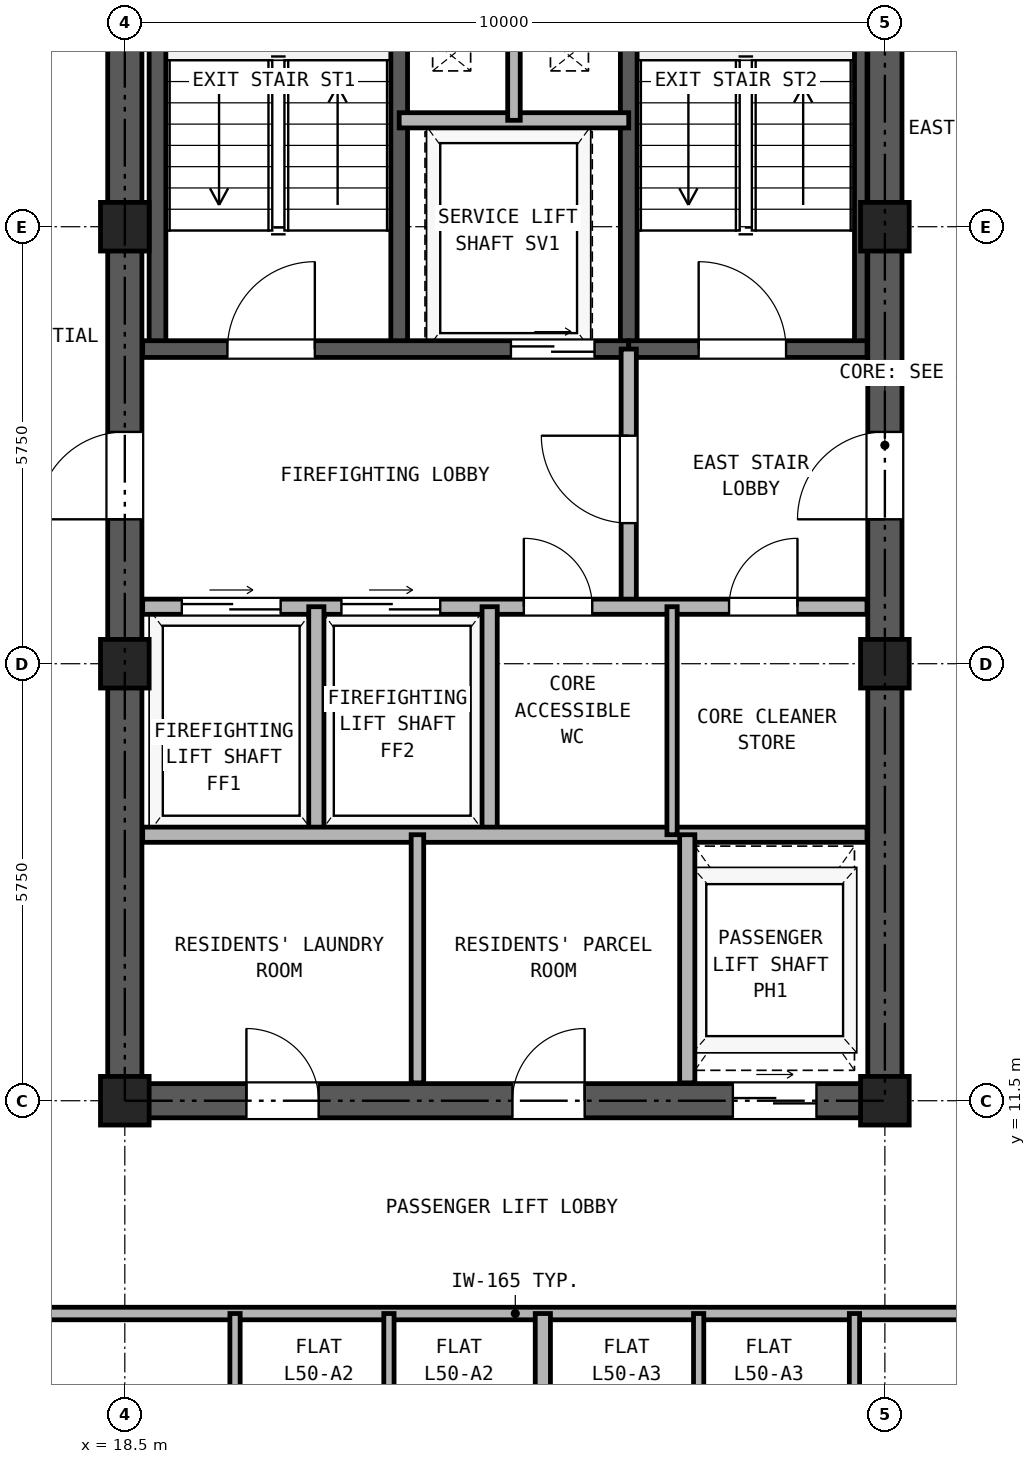
"""IFC4 building model, lengths in metres.
Left out: names, types, materials, properties, quantities, classifications, styles, units other than length and angle.
Written with IfcOpenShell. Run it as: python <this file> out.ifc"""

import sys

from ifc_helpers import new_model, si_unit, direction, frame, frame_2d, origin, origin_2d, place, context, subcontext, project, spatial, rectangle, hollow_rectangle, extrude, source, transform, mapped, element, fill, save


model = new_model("IFC4")
c1 = context("Model", 3, precision=1e-05, world=origin(), true_north=direction((0.0, 1.0)))
c2 = subcontext(c1, "Body", "Model", "MODEL_VIEW")
j1 = project(units=[si_unit("LENGTHUNIT", "METRE"), si_unit("PLANEANGLEUNIT", "RADIAN")], contexts=[c1])
p1 = place(None, origin())
s1 = spatial("IfcSite", under=j1, at=p1, CompositionType="ELEMENT")
p2 = place(p1, origin())
s2 = spatial("IfcBuilding", under=s1, at=p2, CompositionType="ELEMENT")
p3 = place(p2, frame((0.0, 0.0, 178.5)))
s3 = spatial("IfcBuildingStorey", under=s2, at=p3, CompositionType="ELEMENT", Elevation=178.5)
m1 = source(origin(), c2, "Body", "SweptSolid", [
    extrude(hollow_rectangle(XDim=0.64, YDim=0.64, WallThickness=0.035, at=origin_2d()), origin(), (0.0, 0.0, 1.0), 2.95),
])
for number, where, z_axis, x_axis in (
    (1, (18.5, 11.5, 0.0), (0.0, 0.0, 1.0), (1.0, 0.0, 0.0)),
    (2, (18.5, 17.25, 0.0), (0.0, 0.0, 1.0), (1.0, 0.0, 0.0)),
    (3, (18.5, 23.0, 0.0), (0.0, 0.0, 1.0), (1.0, 0.0, 0.0)),
    (4, (28.5, 11.5, 0.0), (0.0, 0.0, 1.0), (1.0, 0.0, 0.0)),
    (5, (28.5, 17.25, 0.0), (0.0, 0.0, 1.0), (1.0, 0.0, 0.0)),
    (6, (28.5, 23.0, 0.0), (0.0, 0.0, 1.0), (1.0, 0.0, 0.0)),
):
    element("IfcColumn", number, at=place(p3, frame(where, z_axis=z_axis, x_axis=x_axis)), inside=s3, PredefinedType="COLUMN", context=c2, shape_type="MappedRepresentation", body=[
        mapped(m1, transform((0.0, 0.0, 0.0), x_axis=(1.0, 0.0, 0.0), y_axis=(0.0, 1.0, 0.0), z_axis=(0.0, 0.0, 1.0), scale=1.0)),
    ])
p4 = place(p3, frame((18.275, 11.5, 0.0), z_axis=(0.0, 0.0, 1.0), x_axis=(1.0, 0.0, 0.0)))
e7 = element("IfcWall", 7, at=p4, inside=s3, PredefinedType="SHEAR", context=c2, shape_type="SweptSolid", body=[
    extrude(rectangle(XDim=10.45, YDim=0.45, at=frame_2d((5.225, 0.0))), origin(), (0.0, 0.0, 1.0), 2.95),
])
p5 = place(p4, frame((1.825, 0.0, 0.0)))
e8 = element("IfcOpeningElement", 8, at=p5, cuts=e7, PredefinedType="OPENING", context=c2, shape_type="SweptSolid", body=[
    extrude(rectangle(XDim=0.95, YDim=2.15, at=frame_2d((0.475, 1.075))), frame((0.0, 0.235, 0.0), z_axis=(0.0, -1.0, 0.0), x_axis=(1.0, 0.0, 0.0)), (0.0, 0.0, 1.0), 0.47),
])
p6 = place(p4, frame((5.325, 0.0, 0.0)))
e9 = element("IfcOpeningElement", 9, at=p6, cuts=e7, PredefinedType="OPENING", context=c2, shape_type="SweptSolid", body=[
    extrude(rectangle(XDim=0.95, YDim=2.15, at=frame_2d((0.475, 1.075))), frame((0.0, 0.235, 0.0), z_axis=(0.0, -1.0, 0.0), x_axis=(1.0, 0.0, 0.0)), (0.0, 0.0, 1.0), 0.47),
])
p7 = place(p4, frame((8.225, 0.0, 0.0)))
e10 = element("IfcOpeningElement", 10, at=p7, cuts=e7, PredefinedType="OPENING", context=c2, shape_type="SweptSolid", body=[
    extrude(rectangle(XDim=1.1, YDim=2.25, at=frame_2d((0.55, 1.125))), frame((0.0, 0.235, 0.0), z_axis=(0.0, -1.0, 0.0), x_axis=(1.0, 0.0, 0.0)), (0.0, 0.0, 1.0), 0.47),
])
p8 = place(p3, frame((18.5, 11.725, 0.0), z_axis=(0.0, 0.0, 1.0), x_axis=(0.0, 1.0, 0.0)))
e11 = element("IfcWall", 11, at=p8, inside=s3, PredefinedType="SHEAR", context=c2, shape_type="SweptSolid", body=[
    extrude(rectangle(XDim=16.8, YDim=0.45, at=frame_2d((8.4, 0.0))), origin(), (0.0, 0.0, 1.0), 2.95),
])
p9 = place(p8, frame((7.425, 0.0, 0.0)))
e12 = element("IfcOpeningElement", 12, at=p9, cuts=e11, PredefinedType="OPENING", context=c2, shape_type="SweptSolid", body=[
    extrude(rectangle(XDim=1.15, YDim=2.2, at=frame_2d((0.575, 1.1))), frame((0.0, 0.235, 0.0), z_axis=(0.0, -1.0, 0.0), x_axis=(1.0, 0.0, 0.0)), (0.0, 0.0, 1.0), 0.47),
])
p10 = place(p3, frame((28.5, 11.725, 0.0), z_axis=(0.0, 0.0, 1.0), x_axis=(0.0, 1.0, 0.0)))
e13 = element("IfcWall", 13, at=p10, inside=s3, PredefinedType="SHEAR", context=c2, shape_type="SweptSolid", body=[
    extrude(rectangle(XDim=16.8, YDim=0.45, at=frame_2d((8.4, 0.0))), origin(), (0.0, 0.0, 1.0), 2.95),
])
p11 = place(p10, frame((7.425, 0.0, 0.0)))
e14 = element("IfcOpeningElement", 14, at=p11, cuts=e13, PredefinedType="OPENING", context=c2, shape_type="SweptSolid", body=[
    extrude(rectangle(XDim=1.15, YDim=2.2, at=frame_2d((0.575, 1.1))), frame((0.0, 0.235, 0.0), z_axis=(0.0, -1.0, 0.0), x_axis=(1.0, 0.0, 0.0)), (0.0, 0.0, 1.0), 0.47),
])
for number, where, z_axis, x_axis in (
    (15, (18.93, 21.39, 0.0), (0.0, 0.0, 1.0), (0.0, 1.0, 0.0)),
    (16, (22.11, 21.39, 0.0), (0.0, 0.0, 1.0), (0.0, 1.0, 0.0)),
    (17, (25.13, 21.39, 0.0), (0.0, 0.0, 1.0), (0.0, 1.0, 0.0)),
):
    element("IfcWall", number, at=place(p3, frame(where, z_axis=z_axis, x_axis=x_axis)), inside=s3, PredefinedType="SOLIDWALL", context=c2, shape_type="SweptSolid", body=[
        extrude(rectangle(XDim=7.11, YDim=0.22, at=frame_2d((3.555, 0.0))), origin(), (0.0, 0.0, 1.0), 2.95),
    ])
p12 = place(p3, frame((28.183, 21.39, 0.0), z_axis=(0.0, 0.0, 1.0), x_axis=(0.0, 1.0, 0.0)))
e18 = element("IfcWall", 18, at=p12, inside=s3, PredefinedType="PARTITIONING", context=c2, shape_type="SweptSolid", body=[
    extrude(rectangle(XDim=6.945, YDim=0.165, at=frame_2d((3.473, 0.0))), origin(), (0.0, 0.0, 1.0), 2.95),
])
p13 = place(p3, frame((18.735, 21.39, 0.0), z_axis=(0.0, 0.0, 1.0), x_axis=(1.0, 0.0, 0.0)))
e19 = element("IfcWall", 19, at=p13, inside=s3, PredefinedType="SOLIDWALL", context=c2, shape_type="SweptSolid", body=[
    extrude(rectangle(XDim=6.395, YDim=0.22, at=frame_2d((3.197, 0.0))), origin(), (0.0, 0.0, 1.0), 2.95),
])
p14 = place(p13, frame((1.115, 0.0, 0.0)))
e20 = element("IfcOpeningElement", 20, at=p14, cuts=e19, PredefinedType="OPENING", context=c2, shape_type="SweptSolid", body=[
    extrude(rectangle(XDim=1.15, YDim=2.2, at=frame_2d((0.575, 1.1))), frame((0.0, 0.12, 0.0), z_axis=(0.0, -1.0, 0.0), x_axis=(1.0, 0.0, 0.0)), (0.0, 0.0, 1.0), 0.24),
])
p15 = place(p13, frame((4.845, 0.0, 0.0)))
e21 = element("IfcOpeningElement", 21, at=p15, cuts=e19, PredefinedType="OPENING", context=c2, shape_type="SweptSolid", body=[
    extrude(rectangle(XDim=1.1, YDim=2.25, at=frame_2d((0.55, 1.125))), frame((0.0, 0.12, 0.0), z_axis=(0.0, -1.0, 0.0), x_axis=(1.0, 0.0, 0.0)), (0.0, 0.0, 1.0), 0.24),
])
p16 = place(p3, frame((25.13, 21.39, 0.0), z_axis=(0.0, 0.0, 1.0), x_axis=(1.0, 0.0, 0.0)))
e22 = element("IfcWall", 22, at=p16, inside=s3, PredefinedType="SOLIDWALL", context=c2, shape_type="SweptSolid", body=[
    extrude(rectangle(XDim=3.135, YDim=0.22, at=frame_2d((1.567, 0.0))), origin(), (0.0, 0.0, 1.0), 2.95),
])
p17 = place(p16, frame((0.92, 0.0, 0.0)))
e23 = element("IfcOpeningElement", 23, at=p17, cuts=e22, PredefinedType="OPENING", context=c2, shape_type="SweptSolid", body=[
    extrude(rectangle(XDim=1.15, YDim=2.2, at=frame_2d((0.575, 1.1))), frame((0.0, 0.12, 0.0), z_axis=(0.0, -1.0, 0.0), x_axis=(1.0, 0.0, 0.0)), (0.0, 0.0, 1.0), 0.24),
])
p18 = place(p3, frame((22.11, 24.4, 0.0), z_axis=(0.0, 0.0, 1.0), x_axis=(1.0, 0.0, 0.0)))
e24 = element("IfcWall", 24, at=p18, inside=s3, PredefinedType="PARTITIONING", context=c2, shape_type="SweptSolid", body=[
    extrude(rectangle(XDim=3.02, YDim=0.2, at=frame_2d((1.51, 0.0))), origin(), (0.0, 0.0, 1.0), 2.95),
])
p19 = place(p3, frame((23.62, 24.4, 0.0), z_axis=(0.0, 0.0, 1.0), x_axis=(0.0, 1.0, 0.0)))
e25 = element("IfcWall", 25, at=p19, inside=s3, PredefinedType="PARTITIONING", context=c2, shape_type="SweptSolid", body=[
    extrude(rectangle(XDim=4.115, YDim=0.165, at=frame_2d((2.058, 0.0))), origin(), (0.0, 0.0, 1.0), 2.95),
])
p20 = place(p3, frame((25.13, 18.0, 0.0), z_axis=(0.0, 0.0, 1.0), x_axis=(0.0, 1.0, 0.0)))
e26 = element("IfcWall", 26, at=p20, inside=s3, PredefinedType="PARTITIONING", context=c2, shape_type="SweptSolid", body=[
    extrude(rectangle(XDim=3.39, YDim=0.2, at=frame_2d((1.695, 0.0))), origin(), (0.0, 0.0, 1.0), 2.95),
])
p21 = place(p20, frame((1.1, 0.0, 0.0)))
e27 = element("IfcOpeningElement", 27, at=p21, cuts=e26, PredefinedType="OPENING", context=c2, shape_type="SweptSolid", body=[
    extrude(rectangle(XDim=1.15, YDim=2.2, at=frame_2d((0.575, 1.1))), frame((0.0, 0.11, 0.0), z_axis=(0.0, -1.0, 0.0), x_axis=(1.0, 0.0, 0.0)), (0.0, 0.0, 1.0), 0.22),
])
p22 = place(p3, frame((18.735, 18.0, 0.0), z_axis=(0.0, 0.0, 1.0), x_axis=(1.0, 0.0, 0.0)))
e28 = element("IfcWall", 28, at=p22, inside=s3, PredefinedType="PARTITIONING", context=c2, shape_type="SweptSolid", body=[
    extrude(rectangle(XDim=9.53, YDim=0.2, at=frame_2d((4.765, 0.0))), origin(), (0.0, 0.0, 1.0), 2.95),
])
p23 = place(p22, frame((0.515, 0.0, 0.0)))
e29 = element("IfcOpeningElement", 29, at=p23, cuts=e28, PredefinedType="OPENING", context=c2, shape_type="SweptSolid", body=[
    extrude(rectangle(XDim=1.3, YDim=2.3, at=frame_2d((0.65, 1.15))), frame((0.0, 0.11, 0.0), z_axis=(0.0, -1.0, 0.0), x_axis=(1.0, 0.0, 0.0)), (0.0, 0.0, 1.0), 0.22),
])
p24 = place(p22, frame((2.615, 0.0, 0.0)))
e30 = element("IfcOpeningElement", 30, at=p24, cuts=e28, PredefinedType="OPENING", context=c2, shape_type="SweptSolid", body=[
    extrude(rectangle(XDim=1.3, YDim=2.3, at=frame_2d((0.65, 1.15))), frame((0.0, 0.11, 0.0), z_axis=(0.0, -1.0, 0.0), x_axis=(1.0, 0.0, 0.0)), (0.0, 0.0, 1.0), 0.22),
])
p25 = place(p22, frame((5.015, 0.0, 0.0)))
e31 = element("IfcOpeningElement", 31, at=p25, cuts=e28, PredefinedType="OPENING", context=c2, shape_type="SweptSolid", body=[
    extrude(rectangle(XDim=0.9, YDim=2.05, at=frame_2d((0.45, 1.025))), frame((0.0, 0.11, 0.0), z_axis=(0.0, -1.0, 0.0), x_axis=(1.0, 0.0, 0.0)), (0.0, 0.0, 1.0), 0.22),
])
p26 = place(p22, frame((7.715, 0.0, 0.0)))
e32 = element("IfcOpeningElement", 32, at=p26, cuts=e28, PredefinedType="OPENING", context=c2, shape_type="SweptSolid", body=[
    extrude(rectangle(XDim=0.9, YDim=2.05, at=frame_2d((0.45, 1.025))), frame((0.0, 0.11, 0.0), z_axis=(0.0, -1.0, 0.0), x_axis=(1.0, 0.0, 0.0)), (0.0, 0.0, 1.0), 0.22),
])
for number, where, z_axis, x_axis in (
    (33, (21.02, 15.0, 0.0), (0.0, 0.0, 1.0), (0.0, 1.0, 0.0)),
    (34, (23.3, 15.0, 0.0), (0.0, 0.0, 1.0), (0.0, 1.0, 0.0)),
):
    element("IfcWall", number, at=place(p3, frame(where, z_axis=z_axis, x_axis=x_axis)), inside=s3, PredefinedType="PARTITIONING", context=c2, shape_type="SweptSolid", body=[
        extrude(rectangle(XDim=3.0, YDim=0.2, at=frame_2d((1.5, 0.0))), origin(), (0.0, 0.0, 1.0), 2.95),
    ])
p27 = place(p3, frame((18.735, 15.0, 0.0), z_axis=(0.0, 0.0, 1.0), x_axis=(1.0, 0.0, 0.0)))
e35 = element("IfcWall", 35, at=p27, inside=s3, PredefinedType="PARTITIONING", context=c2, shape_type="SweptSolid", body=[
    extrude(rectangle(XDim=9.53, YDim=0.2, at=frame_2d((4.765, 0.0))), origin(), (0.0, 0.0, 1.0), 2.95),
])
p28 = place(p3, frame((25.7, 15.0, 0.0), z_axis=(0.0, 0.0, 1.0), x_axis=(0.0, 1.0, 0.0)))
e36 = element("IfcWall", 36, at=p28, inside=s3, PredefinedType="PARTITIONING", context=c2, shape_type="SweptSolid", body=[
    extrude(rectangle(XDim=3.0, YDim=0.135, at=frame_2d((1.5, 0.0))), origin(), (0.0, 0.0, 1.0), 2.95),
])
p29 = place(p3, frame((22.35, 11.735, 0.0), z_axis=(0.0, 0.0, 1.0), x_axis=(0.0, 1.0, 0.0)))
e37 = element("IfcWall", 37, at=p29, inside=s3, PredefinedType="PARTITIONING", context=c2, shape_type="SweptSolid", body=[
    extrude(rectangle(XDim=3.265, YDim=0.165, at=frame_2d((1.632, 0.0))), origin(), (0.0, 0.0, 1.0), 2.95),
])
p30 = place(p3, frame((25.9, 11.735, 0.0), z_axis=(0.0, 0.0, 1.0), x_axis=(0.0, 1.0, 0.0)))
e38 = element("IfcWall", 38, at=p30, inside=s3, PredefinedType="PARTITIONING", context=c2, shape_type="SweptSolid", body=[
    extrude(rectangle(XDim=3.265, YDim=0.2, at=frame_2d((1.632, 0.0))), origin(), (0.0, 0.0, 1.0), 2.95),
])
p31 = place(p3, frame((0.16, 8.7, 0.0), z_axis=(0.0, 0.0, 1.0), x_axis=(1.0, 0.0, 0.0)))
e39 = element("IfcWall", 39, at=p31, inside=s3, PredefinedType="PARTITIONING", context=c2, shape_type="SweptSolid", body=[
    extrude(rectangle(XDim=41.48, YDim=0.165, at=frame_2d((20.74, 0.0))), origin(), (0.0, 0.0, 1.0), 2.583),
])
p32 = place(p31, frame((11.815, 0.0, 0.0)))
e40 = element("IfcOpeningElement", 40, at=p32, cuts=e39, PredefinedType="OPENING", context=c2, shape_type="SweptSolid", body=[
    extrude(rectangle(XDim=1.0, YDim=2.15, at=frame_2d((0.5, 1.075))), frame((0.0, 0.093, 0.0), z_axis=(0.0, -1.0, 0.0), x_axis=(1.0, 0.0, 0.0)), (0.0, 0.0, 1.0), 0.185),
])
p33 = place(p31, frame((16.115, 0.0, 0.0)))
e41 = element("IfcOpeningElement", 41, at=p33, cuts=e39, PredefinedType="OPENING", context=c2, shape_type="SweptSolid", body=[
    extrude(rectangle(XDim=1.0, YDim=2.15, at=frame_2d((0.5, 1.075))), frame((0.0, 0.093, 0.0), z_axis=(0.0, -1.0, 0.0), x_axis=(1.0, 0.0, 0.0)), (0.0, 0.0, 1.0), 0.185),
])
p34 = place(p31, frame((29.84, 0.0, 0.0)))
e42 = element("IfcOpeningElement", 42, at=p34, cuts=e39, PredefinedType="OPENING", context=c2, shape_type="SweptSolid", body=[
    extrude(rectangle(XDim=1.0, YDim=2.15, at=frame_2d((0.5, 1.075))), frame((0.0, 0.093, 0.0), z_axis=(0.0, -1.0, 0.0), x_axis=(1.0, 0.0, 0.0)), (0.0, 0.0, 1.0), 0.185),
])
p35 = place(p31, frame((33.615, 0.0, 0.0)))
e43 = element("IfcOpeningElement", 43, at=p35, cuts=e39, PredefinedType="OPENING", context=c2, shape_type="SweptSolid", body=[
    extrude(rectangle(XDim=1.0, YDim=2.15, at=frame_2d((0.5, 1.075))), frame((0.0, 0.093, 0.0), z_axis=(0.0, -1.0, 0.0), x_axis=(1.0, 0.0, 0.0)), (0.0, 0.0, 1.0), 0.185),
])
for number, where, z_axis, x_axis in (
    (44, (19.95, 6.55, 0.0), (0.0, 0.0, 1.0), (0.0, 1.0, 0.0)),
    (45, (21.975, 6.55, 0.0), (0.0, 0.0, 1.0), (0.0, 1.0, 0.0)),
):
    element("IfcWall", number, at=place(p3, frame(where, z_axis=z_axis, x_axis=x_axis)), inside=s3, PredefinedType="PARTITIONING", context=c2, shape_type="SweptSolid", body=[
        extrude(rectangle(XDim=2.15, YDim=0.135, at=frame_2d((1.075, 0.0))), origin(), (0.0, 0.0, 1.0), 2.95),
    ])
p36 = place(p3, frame((24.0, 0.16, 0.0), z_axis=(0.0, 0.0, 1.0), x_axis=(0.0, 1.0, 0.0)))
e46 = element("IfcWall", 46, at=p36, inside=s3, PredefinedType="PARTITIONING", context=c2, shape_type="SweptSolid", body=[
    extrude(rectangle(XDim=8.54, YDim=0.2, at=frame_2d((4.27, 0.0))), origin(), (0.0, 0.0, 1.0), 2.95),
])
for number, where, z_axis, x_axis in (
    (47, (26.05, 6.55, 0.0), (0.0, 0.0, 1.0), (0.0, 1.0, 0.0)),
    (48, (28.1, 6.55, 0.0), (0.0, 0.0, 1.0), (0.0, 1.0, 0.0)),
):
    element("IfcWall", number, at=place(p3, frame(where, z_axis=z_axis, x_axis=x_axis)), inside=s3, PredefinedType="PARTITIONING", context=c2, shape_type="SweptSolid", body=[
        extrude(rectangle(XDim=2.15, YDim=0.135, at=frame_2d((1.075, 0.0))), origin(), (0.0, 0.0, 1.0), 2.95),
    ])
p37 = place(p14, frame((1.15, 0.0, 0.0), z_axis=(0.0, 0.0, 1.0), x_axis=(-1.0, 0.0, 0.0)))
e49 = element("IfcDoor", 49, at=p37, inside=s3, OperationType="SINGLE_SWING_RIGHT", PredefinedType="DOOR", context=c2, shape_type="SweptSolid", body=[
    extrude(rectangle(XDim=1.15, YDim=2.2, at=frame_2d((0.575, 1.1))), frame((0.0, 0.025, 0.0), z_axis=(0.0, -1.0, 0.0), x_axis=(1.0, 0.0, 0.0)), (0.0, 0.0, 1.0), 0.05),
])
fill(e20, e49)
p38 = place(p17, frame((1.15, 0.0, 0.0), z_axis=(0.0, 0.0, 1.0), x_axis=(-1.0, 0.0, 0.0)))
e50 = element("IfcDoor", 50, at=p38, inside=s3, OperationType="SINGLE_SWING_LEFT", PredefinedType="DOOR", context=c2, shape_type="SweptSolid", body=[
    extrude(rectangle(XDim=1.15, YDim=2.2, at=frame_2d((0.575, 1.1))), frame((0.0, 0.025, 0.0), z_axis=(0.0, -1.0, 0.0), x_axis=(1.0, 0.0, 0.0)), (0.0, 0.0, 1.0), 0.05),
])
fill(e23, e50)
p39 = place(p15, frame((1.1, 0.0, 0.0), z_axis=(0.0, 0.0, 1.0), x_axis=(-1.0, 0.0, 0.0)))
e51 = element("IfcDoor", 51, at=p39, inside=s3, OperationType="DOUBLE_DOOR_SLIDING", PredefinedType="DOOR", context=c2, shape_type="SweptSolid", body=[
    extrude(rectangle(XDim=1.1, YDim=2.25, at=frame_2d((0.55, 1.125))), frame((0.0, 0.025, 0.0), z_axis=(0.0, -1.0, 0.0), x_axis=(1.0, 0.0, 0.0)), (0.0, 0.0, 1.0), 0.05),
])
fill(e21, e51)
p40 = place(p21, origin())
e52 = element("IfcDoor", 52, at=p40, inside=s3, OperationType="SINGLE_SWING_RIGHT", PredefinedType="DOOR", context=c2, shape_type="SweptSolid", body=[
    extrude(rectangle(XDim=1.15, YDim=2.2, at=frame_2d((0.575, 1.1))), frame((0.0, 0.025, 0.0), z_axis=(0.0, -1.0, 0.0), x_axis=(1.0, 0.0, 0.0)), (0.0, 0.0, 1.0), 0.05),
])
fill(e27, e52)
p41 = place(p23, origin())
e53 = element("IfcDoor", 53, at=p41, inside=s3, OperationType="DOUBLE_DOOR_SLIDING", PredefinedType="DOOR", context=c2, shape_type="SweptSolid", body=[
    extrude(rectangle(XDim=1.3, YDim=2.3, at=frame_2d((0.65, 1.15))), frame((0.0, 0.025, 0.0), z_axis=(0.0, -1.0, 0.0), x_axis=(1.0, 0.0, 0.0)), (0.0, 0.0, 1.0), 0.05),
])
fill(e29, e53)
p42 = place(p24, origin())
e54 = element("IfcDoor", 54, at=p42, inside=s3, OperationType="DOUBLE_DOOR_SLIDING", PredefinedType="DOOR", context=c2, shape_type="SweptSolid", body=[
    extrude(rectangle(XDim=1.3, YDim=2.3, at=frame_2d((0.65, 1.15))), frame((0.0, 0.025, 0.0), z_axis=(0.0, -1.0, 0.0), x_axis=(1.0, 0.0, 0.0)), (0.0, 0.0, 1.0), 0.05),
])
fill(e30, e54)
p43 = place(p25, frame((0.9, 0.0, 0.0), z_axis=(0.0, 0.0, 1.0), x_axis=(-1.0, 0.0, 0.0)))
e55 = element("IfcDoor", 55, at=p43, inside=s3, OperationType="SINGLE_SWING_LEFT", PredefinedType="DOOR", context=c2, shape_type="SweptSolid", body=[
    extrude(rectangle(XDim=0.9, YDim=2.05, at=frame_2d((0.45, 1.025))), frame((0.0, 0.025, 0.0), z_axis=(0.0, -1.0, 0.0), x_axis=(1.0, 0.0, 0.0)), (0.0, 0.0, 1.0), 0.05),
])
fill(e31, e55)
p44 = place(p26, frame((0.9, 0.0, 0.0), z_axis=(0.0, 0.0, 1.0), x_axis=(-1.0, 0.0, 0.0)))
e56 = element("IfcDoor", 56, at=p44, inside=s3, OperationType="SINGLE_SWING_RIGHT", PredefinedType="DOOR", context=c2, shape_type="SweptSolid", body=[
    extrude(rectangle(XDim=0.9, YDim=2.05, at=frame_2d((0.45, 1.025))), frame((0.0, 0.025, 0.0), z_axis=(0.0, -1.0, 0.0), x_axis=(1.0, 0.0, 0.0)), (0.0, 0.0, 1.0), 0.05),
])
fill(e32, e56)
p45 = place(p9, frame((1.15, 0.0, 0.0), z_axis=(0.0, 0.0, 1.0), x_axis=(-1.0, 0.0, 0.0)))
e57 = element("IfcDoor", 57, at=p45, inside=s3, OperationType="SINGLE_SWING_LEFT", PredefinedType="DOOR", context=c2, shape_type="SweptSolid", body=[
    extrude(rectangle(XDim=1.15, YDim=2.2, at=frame_2d((0.575, 1.1))), frame((0.0, 0.025, 0.0), z_axis=(0.0, -1.0, 0.0), x_axis=(1.0, 0.0, 0.0)), (0.0, 0.0, 1.0), 0.05),
])
fill(e12, e57)
p46 = place(p11, origin())
e58 = element("IfcDoor", 58, at=p46, inside=s3, OperationType="SINGLE_SWING_LEFT", PredefinedType="DOOR", context=c2, shape_type="SweptSolid", body=[
    extrude(rectangle(XDim=1.15, YDim=2.2, at=frame_2d((0.575, 1.1))), frame((0.0, 0.025, 0.0), z_axis=(0.0, -1.0, 0.0), x_axis=(1.0, 0.0, 0.0)), (0.0, 0.0, 1.0), 0.05),
])
fill(e14, e58)
p47 = place(p5, frame((0.95, 0.0, 0.0), z_axis=(0.0, 0.0, 1.0), x_axis=(-1.0, 0.0, 0.0)))
e59 = element("IfcDoor", 59, at=p47, inside=s3, OperationType="SINGLE_SWING_LEFT", PredefinedType="DOOR", context=c2, shape_type="SweptSolid", body=[
    extrude(rectangle(XDim=0.95, YDim=2.15, at=frame_2d((0.475, 1.075))), frame((0.0, 0.025, 0.0), z_axis=(0.0, -1.0, 0.0), x_axis=(1.0, 0.0, 0.0)), (0.0, 0.0, 1.0), 0.05),
])
fill(e8, e59)
p48 = place(p6, frame((0.95, 0.0, 0.0), z_axis=(0.0, 0.0, 1.0), x_axis=(-1.0, 0.0, 0.0)))
e60 = element("IfcDoor", 60, at=p48, inside=s3, OperationType="SINGLE_SWING_RIGHT", PredefinedType="DOOR", context=c2, shape_type="SweptSolid", body=[
    extrude(rectangle(XDim=0.95, YDim=2.15, at=frame_2d((0.475, 1.075))), frame((0.0, 0.025, 0.0), z_axis=(0.0, -1.0, 0.0), x_axis=(1.0, 0.0, 0.0)), (0.0, 0.0, 1.0), 0.05),
])
fill(e9, e60)
p49 = place(p7, frame((1.1, 0.0, 0.0), z_axis=(0.0, 0.0, 1.0), x_axis=(-1.0, 0.0, 0.0)))
e61 = element("IfcDoor", 61, at=p49, inside=s3, OperationType="DOUBLE_DOOR_SLIDING", PredefinedType="DOOR", context=c2, shape_type="SweptSolid", body=[
    extrude(rectangle(XDim=1.1, YDim=2.25, at=frame_2d((0.55, 1.125))), frame((0.0, 0.025, 0.0), z_axis=(0.0, -1.0, 0.0), x_axis=(1.0, 0.0, 0.0)), (0.0, 0.0, 1.0), 0.05),
])
fill(e10, e61)
save(model, sys.argv[1])
